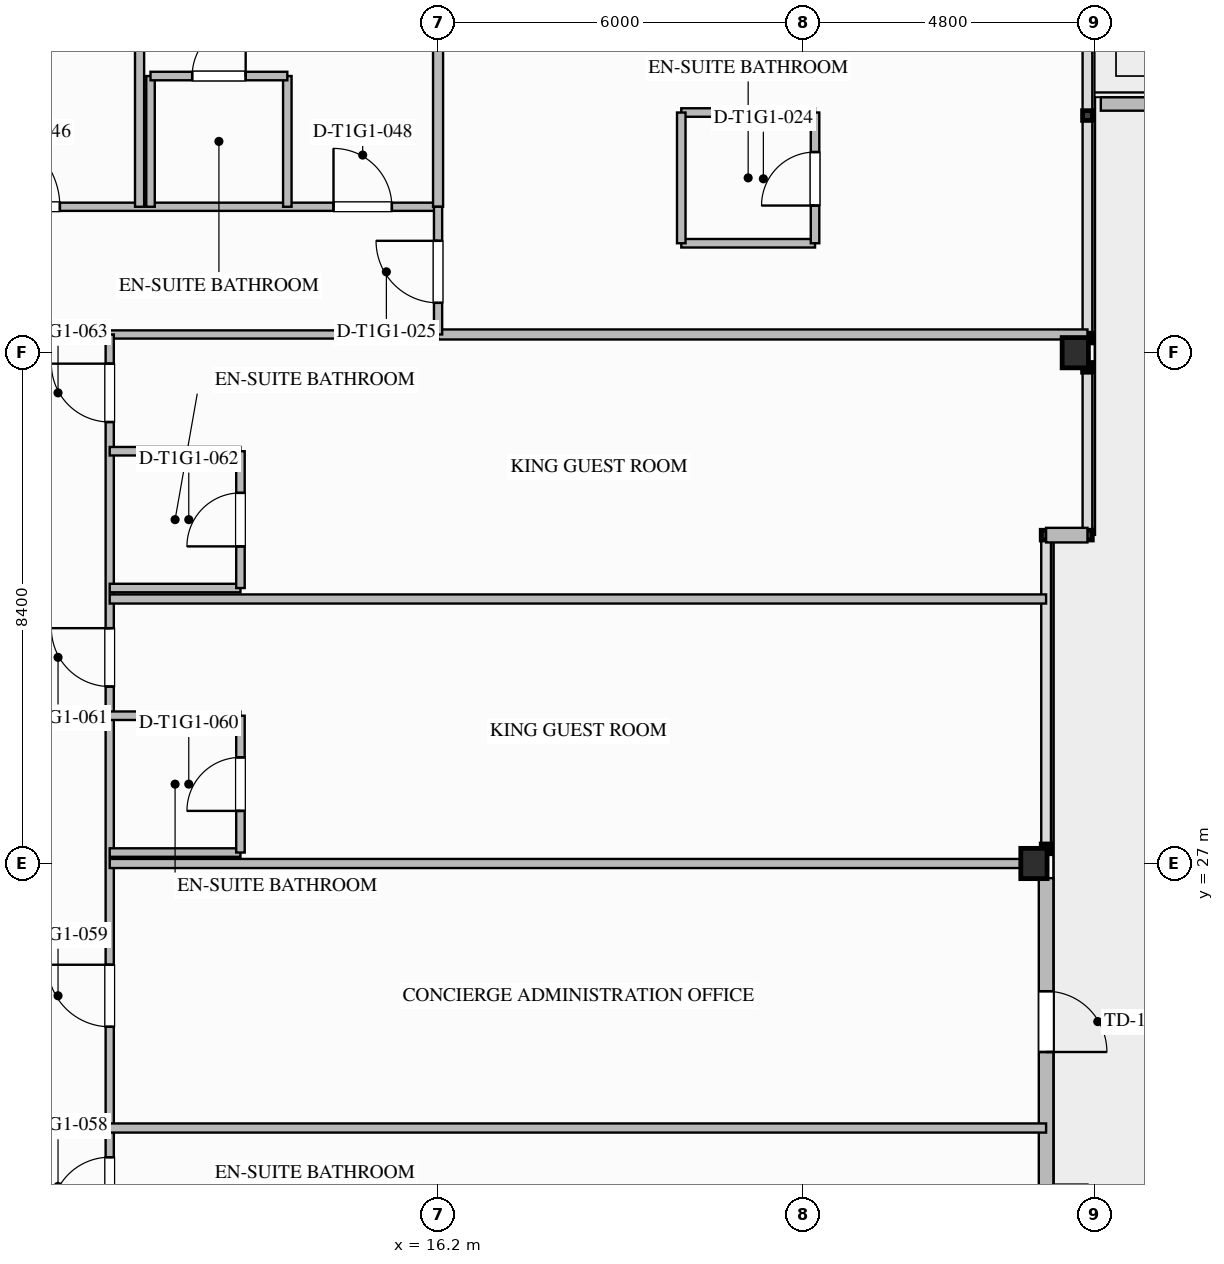
"""IFC4 building model, lengths in metres.
Left out: names, types, materials, properties, quantities, classifications, styles, units other than length and angle.
Written with IfcOpenShell. Run it as: python <this file> out.ifc"""

import sys

from ifc_helpers import new_model, si_unit, direction, frame, frame_2d, origin, origin_2d, place, context, subcontext, project, spatial, rectangle, i_section, extrude, element, fill, save


model = new_model("IFC4")
c1 = context("Model", 3, precision=1e-05, world=origin(), true_north=direction((0.0, 1.0)))
c2 = subcontext(c1, "Body", "Model", "MODEL_VIEW")
j1 = project(units=[si_unit("LENGTHUNIT", "METRE"), si_unit("PLANEANGLEUNIT", "RADIAN")], contexts=[c1])
p1 = place(None, origin())
s1 = spatial("IfcSite", under=j1, at=p1, CompositionType="ELEMENT")
p2 = place(p1, origin())
s2 = spatial("IfcBuilding", under=s1, at=p2, CompositionType="ELEMENT")
p3 = place(p2, frame((0.0, 0.0, 33.2)))
s3 = spatial("IfcBuildingStorey", under=s2, at=p3, CompositionType="ELEMENT", Elevation=33.2)
for number, where, z_axis, x_axis in (
    (1, (26.0, 27.0, -0.26), (0.0, 0.0, 1.0), (1.0, 0.0, 0.0)),
    (2, (26.68, 35.4, -0.26), (0.0, 0.0, 1.0), (1.0, 0.0, 0.0)),
):
    element("IfcColumn", number, at=place(p3, frame(where, z_axis=z_axis, x_axis=x_axis)), inside=s3, PredefinedType="COLUMN", context=c2, shape_type="SweptSolid", body=[
        extrude(i_section(OverallWidth=0.432, OverallDepth=0.498, WebThickness=0.056, FlangeThickness=0.089, FilletRadius=0.03, at=origin_2d()), origin(), (0.0, 0.0, 1.0), 3.757),
    ])
p4 = place(p3, frame((27.1, 39.49, 0.0), z_axis=(0.0, 0.0, 1.0), x_axis=(1.0, 0.0, 0.0)))
e3 = element("IfcWall", 3, at=p4, inside=s3, PredefinedType="PARAPET", context=c2, shape_type="SweptSolid", body=[
    extrude(rectangle(XDim=11.79, YDim=0.22, at=frame_2d((5.895, 0.0))), origin(), (0.0, 0.0, 1.0), 1.2),
])
p5 = place(p3, frame((26.2, 26.759, 0.0), z_axis=(0.0, 0.0, 1.0), x_axis=(0.0, -1.0, 0.0)))
e4 = element("IfcWall", 4, at=p5, inside=s3, PredefinedType="STANDARD", context=c2, shape_type="SweptSolid", body=[
    extrude(rectangle(XDim=5.279, YDim=0.24, at=frame_2d((2.64, 0.0))), origin(), (0.0, 0.0, 1.0), 2.629),
])
p6 = place(p5, frame((1.859, 0.0, 0.0)))
e5 = element("IfcOpeningElement", 5, at=p6, cuts=e4, PredefinedType="OPENING", context=c2, shape_type="SweptSolid", body=[
    extrude(rectangle(XDim=1.0, YDim=2.2, at=frame_2d((0.5, 1.1))), frame((0.0, 0.13, 0.0), z_axis=(0.0, -1.0, 0.0), x_axis=(1.0, 0.0, 0.0)), (0.0, 0.0, 1.0), 0.26),
])
p7 = place(p3, frame((26.88, 32.4, 0.0), z_axis=(0.0, 0.0, 1.0), x_axis=(-1.0, 0.0, 0.0)))
e6 = element("IfcWall", 6, at=p7, inside=s3, PredefinedType="STANDARD", context=c2, shape_type="SweptSolid", body=[
    extrude(rectangle(XDim=0.68, YDim=0.24, at=frame_2d((0.34, 0.0))), origin(), (0.0, 0.0, 1.0), 3.24),
])
p8 = place(p3, frame((-16.2, 37.8, 0.0), z_axis=(0.0, 0.0, 1.0), x_axis=(1.0, 0.0, 0.0)))
e7 = element("IfcWall", 7, at=p8, inside=s3, PredefinedType="PARTITIONING", context=c2, shape_type="SweptSolid", body=[
    extrude(rectangle(XDim=32.4, YDim=0.135, at=frame_2d((16.2, 0.0))), origin(), (0.0, 0.0, 1.0), 3.24),
])
p9 = place(p8, frame((3.189, 0.0, 0.0)))
e8 = element("IfcOpeningElement", 8, at=p9, cuts=e7, PredefinedType="OPENING", context=c2, shape_type="SweptSolid", body=[
    extrude(rectangle(XDim=0.96, YDim=2.15, at=frame_2d((0.48, 1.075))), frame((0.0, 0.077, 0.0), z_axis=(0.0, -1.0, 0.0), x_axis=(1.0, 0.0, 0.0)), (0.0, 0.0, 1.0), 0.155),
])
p10 = place(p8, frame((8.229, 0.0, 0.0)))
e9 = element("IfcOpeningElement", 9, at=p10, cuts=e7, PredefinedType="OPENING", context=c2, shape_type="SweptSolid", body=[
    extrude(rectangle(XDim=1.26, YDim=2.2, at=frame_2d((0.63, 1.1))), frame((0.0, 0.077, 0.0), z_axis=(0.0, -1.0, 0.0), x_axis=(1.0, 0.0, 0.0)), (0.0, 0.0, 1.0), 0.155),
])
p11 = place(p8, frame((12.78, 0.0, 0.0)))
e10 = element("IfcOpeningElement", 10, at=p11, cuts=e7, PredefinedType="OPENING", context=c2, shape_type="SweptSolid", body=[
    extrude(rectangle(XDim=1.02, YDim=2.15, at=frame_2d((0.51, 1.075))), frame((0.0, 0.077, 0.0), z_axis=(0.0, -1.0, 0.0), x_axis=(1.0, 0.0, 0.0)), (0.0, 0.0, 1.0), 0.155),
])
p12 = place(p8, frame((19.425, 0.0, 0.0)))
e11 = element("IfcOpeningElement", 11, at=p12, cuts=e7, PredefinedType="OPENING", context=c2, shape_type="SweptSolid", body=[
    extrude(rectangle(XDim=0.96, YDim=2.15, at=frame_2d((0.48, 1.075))), frame((0.0, 0.077, 0.0), z_axis=(0.0, -1.0, 0.0), x_axis=(1.0, 0.0, 0.0)), (0.0, 0.0, 1.0), 0.155),
])
p13 = place(p8, frame((24.92, 0.0, 0.0)))
e12 = element("IfcOpeningElement", 12, at=p13, cuts=e7, PredefinedType="OPENING", context=c2, shape_type="SweptSolid", body=[
    extrude(rectangle(XDim=1.26, YDim=2.2, at=frame_2d((0.63, 1.1))), frame((0.0, 0.077, 0.0), z_axis=(0.0, -1.0, 0.0), x_axis=(1.0, 0.0, 0.0)), (0.0, 0.0, 1.0), 0.155),
])
p14 = place(p8, frame((30.68, 0.0, 0.0)))
e13 = element("IfcOpeningElement", 13, at=p14, cuts=e7, PredefinedType="OPENING", context=c2, shape_type="SweptSolid", body=[
    extrude(rectangle(XDim=0.96, YDim=2.15, at=frame_2d((0.48, 1.075))), frame((0.0, 0.077, 0.0), z_axis=(0.0, -1.0, 0.0), x_axis=(1.0, 0.0, 0.0)), (0.0, 0.0, 1.0), 0.155),
])
p15 = place(p3, frame((10.8, 35.7, 0.0), z_axis=(0.0, 0.0, 1.0), x_axis=(1.0, 0.0, 0.0)))
e14 = element("IfcWall", 14, at=p15, inside=s3, PredefinedType="PARTITIONING", context=c2, shape_type="SweptSolid", body=[
    extrude(rectangle(XDim=5.4, YDim=0.135, at=frame_2d((2.7, 0.0))), origin(), (0.0, 0.0, 1.0), 3.24),
])
p16 = place(p3, frame((10.8, 18.3, 0.0), z_axis=(0.0, 0.0, 1.0), x_axis=(0.0, 1.0, 0.0)))
e15 = element("IfcWall", 15, at=p16, inside=s3, PredefinedType="PARTITIONING", context=c2, shape_type="SweptSolid", body=[
    extrude(rectangle(XDim=17.4, YDim=0.135, at=frame_2d((8.7, 0.0))), origin(), (0.0, 0.0, 1.0), 3.24),
])
p17 = place(p16, frame((2.91, 0.0, 0.0)))
e16 = element("IfcOpeningElement", 16, at=p17, cuts=e15, PredefinedType="OPENING", context=c2, shape_type="SweptSolid", body=[
    extrude(rectangle(XDim=0.96, YDim=2.15, at=frame_2d((0.48, 1.075))), frame((0.0, 0.077, 0.0), z_axis=(0.0, -1.0, 0.0), x_axis=(1.0, 0.0, 0.0)), (0.0, 0.0, 1.0), 0.155),
])
p18 = place(p16, frame((6.015, 0.0, 0.0)))
e17 = element("IfcOpeningElement", 17, at=p18, cuts=e15, PredefinedType="OPENING", context=c2, shape_type="SweptSolid", body=[
    extrude(rectangle(XDim=1.02, YDim=2.15, at=frame_2d((0.51, 1.075))), frame((0.0, 0.077, 0.0), z_axis=(0.0, -1.0, 0.0), x_axis=(1.0, 0.0, 0.0)), (0.0, 0.0, 1.0), 0.155),
])
p19 = place(p16, frame((11.61, 0.0, 0.0)))
e18 = element("IfcOpeningElement", 18, at=p19, cuts=e15, PredefinedType="OPENING", context=c2, shape_type="SweptSolid", body=[
    extrude(rectangle(XDim=0.96, YDim=2.15, at=frame_2d((0.48, 1.075))), frame((0.0, 0.077, 0.0), z_axis=(0.0, -1.0, 0.0), x_axis=(1.0, 0.0, 0.0)), (0.0, 0.0, 1.0), 0.155),
])
p20 = place(p16, frame((15.96, 0.0, 0.0)))
e19 = element("IfcOpeningElement", 19, at=p20, cuts=e15, PredefinedType="OPENING", context=c2, shape_type="SweptSolid", body=[
    extrude(rectangle(XDim=0.96, YDim=2.15, at=frame_2d((0.48, 1.075))), frame((0.0, 0.077, 0.0), z_axis=(0.0, -1.0, 0.0), x_axis=(1.0, 0.0, 0.0)), (0.0, 0.0, 1.0), 0.155),
])
p21 = place(p3, frame((16.2, 37.8, 0.0), z_axis=(0.0, 0.0, 1.0), x_axis=(0.0, 1.0, 0.0)))
e20 = element("IfcWall", 20, at=p21, inside=s3, PredefinedType="PARTITIONING", context=c2, shape_type="SweptSolid", body=[
    extrude(rectangle(XDim=16.08, YDim=0.165, at=frame_2d((8.04, 0.0))), origin(), (0.0, 0.0, 1.0), 2.298),
])
p22 = place(p3, frame((16.2, 35.7, 0.0), z_axis=(0.0, 0.0, 1.0), x_axis=(1.0, 0.0, 0.0)))
e21 = element("IfcWall", 21, at=p22, inside=s3, PredefinedType="PARTITIONING", context=c2, shape_type="SweptSolid", body=[
    extrude(rectangle(XDim=10.68, YDim=0.165, at=frame_2d((5.34, 0.0))), origin(), (0.0, 0.0, 1.0), 2.298),
])
p23 = place(p3, frame((16.2, 35.7, 0.0), z_axis=(0.0, 0.0, 1.0), x_axis=(0.0, 1.0, 0.0)))
e22 = element("IfcWall", 22, at=p23, inside=s3, PredefinedType="PARTITIONING", context=c2, shape_type="SweptSolid", body=[
    extrude(rectangle(XDim=2.1, YDim=0.135, at=frame_2d((1.05, 0.0))), origin(), (0.0, 0.0, 1.0), 2.298),
])
p24 = place(p23, frame((0.52, 0.0, 0.0)))
e23 = element("IfcOpeningElement", 23, at=p24, cuts=e22, PredefinedType="OPENING", context=c2, shape_type="SweptSolid", body=[
    extrude(rectangle(XDim=1.02, YDim=2.15, at=frame_2d((0.51, 1.075))), frame((0.0, 0.077, 0.0), z_axis=(0.0, -1.0, 0.0), x_axis=(1.0, 0.0, 0.0)), (0.0, 0.0, 1.0), 0.155),
])
for number, where, z_axis, x_axis in (
    (24, (20.2, 37.2, 0.0), (0.0, 0.0, 1.0), (1.0, 0.0, 0.0)),
    (25, (20.2, 39.35, 0.0), (0.0, 0.0, 1.0), (1.0, 0.0, 0.0)),
):
    element("IfcWall", number, at=place(p3, frame(where, z_axis=z_axis, x_axis=x_axis)), inside=s3, PredefinedType="PLUMBINGWALL", context=c2, shape_type="SweptSolid", body=[
        extrude(rectangle(XDim=2.2, YDim=0.14, at=frame_2d((1.1, 0.0))), origin(), (0.0, 0.0, 1.0), 3.24),
    ])
p25 = place(p3, frame((20.2, 37.2, 0.0), z_axis=(0.0, 0.0, 1.0), x_axis=(0.0, 1.0, 0.0)))
e26 = element("IfcWall", 26, at=p25, inside=s3, PredefinedType="PLUMBINGWALL", context=c2, shape_type="SweptSolid", body=[
    extrude(rectangle(XDim=2.15, YDim=0.14, at=frame_2d((1.075, 0.0))), origin(), (0.0, 0.0, 1.0), 3.24),
])
p26 = place(p3, frame((22.4, 37.2, 0.0), z_axis=(0.0, 0.0, 1.0), x_axis=(0.0, 1.0, 0.0)))
e27 = element("IfcWall", 27, at=p26, inside=s3, PredefinedType="PLUMBINGWALL", context=c2, shape_type="SweptSolid", body=[
    extrude(rectangle(XDim=2.15, YDim=0.14, at=frame_2d((1.075, 0.0))), origin(), (0.0, 0.0, 1.0), 3.24),
])
p27 = place(p26, frame((0.62, 0.0, 0.0)))
e28 = element("IfcOpeningElement", 28, at=p27, cuts=e27, PredefinedType="OPENING", context=c2, shape_type="SweptSolid", body=[
    extrude(rectangle(XDim=0.88, YDim=2.1, at=frame_2d((0.44, 1.05))), frame((0.0, 0.08, 0.0), z_axis=(0.0, -1.0, 0.0), x_axis=(1.0, 0.0, 0.0)), (0.0, 0.0, 1.0), 0.16),
])
p28 = place(p3, frame((11.291, 37.8, 0.0), z_axis=(0.0, 0.0, 1.0), x_axis=(0.0, 1.0, 0.0)))
e29 = element("IfcWall", 29, at=p28, inside=s3, PredefinedType="PARTITIONING", context=c2, shape_type="SweptSolid", body=[
    extrude(rectangle(XDim=16.08, YDim=0.15, at=frame_2d((8.04, 0.0))), origin(), (0.0, 0.0, 1.0), 3.24),
])
for number, where, z_axis, x_axis in (
    (30, (11.471, 37.8, 0.0), (0.0, 0.0, 1.0), (0.0, 1.0, 0.0)),
    (31, (13.721, 37.8, 0.0), (0.0, 0.0, 1.0), (0.0, 1.0, 0.0)),
):
    element("IfcWall", number, at=place(p3, frame(where, z_axis=z_axis, x_axis=x_axis)), inside=s3, PredefinedType="PLUMBINGWALL", context=c2, shape_type="SweptSolid", body=[
        extrude(rectangle(XDim=2.15, YDim=0.14, at=frame_2d((1.075, 0.0))), origin(), (0.0, 0.0, 1.0), 3.24),
    ])
p29 = place(p3, frame((11.471, 39.95, 0.0), z_axis=(0.0, 0.0, 1.0), x_axis=(1.0, 0.0, 0.0)))
e32 = element("IfcWall", 32, at=p29, inside=s3, PredefinedType="PLUMBINGWALL", context=c2, shape_type="SweptSolid", body=[
    extrude(rectangle(XDim=2.25, YDim=0.14, at=frame_2d((1.125, 0.0))), origin(), (0.0, 0.0, 1.0), 3.24),
])
p30 = place(p29, frame((0.685, 0.0, 0.0)))
e33 = element("IfcOpeningElement", 33, at=p30, cuts=e32, PredefinedType="OPENING", context=c2, shape_type="SweptSolid", body=[
    extrude(rectangle(XDim=0.88, YDim=2.1, at=frame_2d((0.44, 1.05))), frame((0.0, 0.08, 0.0), z_axis=(0.0, -1.0, 0.0), x_axis=(1.0, 0.0, 0.0)), (0.0, 0.0, 1.0), 0.16),
])
p31 = place(p3, frame((10.8, 22.65, 0.0), z_axis=(0.0, 0.0, 1.0), x_axis=(1.0, 0.0, 0.0)))
e34 = element("IfcWall", 34, at=p31, inside=s3, PredefinedType="PARTITIONING", context=c2, shape_type="SweptSolid", body=[
    extrude(rectangle(XDim=15.4, YDim=0.15, at=frame_2d((7.7, 0.0))), origin(), (0.0, 0.0, 1.0), 3.24),
])
p32 = place(p3, frame((10.8, 27.0, 0.0), z_axis=(0.0, 0.0, 1.0), x_axis=(1.0, 0.0, 0.0)))
e35 = element("IfcWall", 35, at=p32, inside=s3, PredefinedType="PARTITIONING", context=c2, shape_type="SweptSolid", body=[
    extrude(rectangle(XDim=15.4, YDim=0.15, at=frame_2d((7.7, 0.0))), origin(), (0.0, 0.0, 1.0), 2.298),
])
p33 = place(p3, frame((10.8, 27.18, 0.0), z_axis=(0.0, 0.0, 1.0), x_axis=(1.0, 0.0, 0.0)))
e36 = element("IfcWall", 36, at=p33, inside=s3, PredefinedType="PLUMBINGWALL", context=c2, shape_type="SweptSolid", body=[
    extrude(rectangle(XDim=2.15, YDim=0.14, at=frame_2d((1.075, 0.0))), origin(), (0.0, 0.0, 1.0), 2.617),
])
p34 = place(p3, frame((10.8, 29.43, 0.0), z_axis=(0.0, 0.0, 1.0), x_axis=(1.0, 0.0, 0.0)))
e37 = element("IfcWall", 37, at=p34, inside=s3, PredefinedType="PLUMBINGWALL", context=c2, shape_type="SweptSolid", body=[
    extrude(rectangle(XDim=2.15, YDim=0.14, at=frame_2d((1.075, 0.0))), origin(), (0.0, 0.0, 1.0), 3.24),
])
p35 = place(p3, frame((12.95, 27.18, 0.0), z_axis=(0.0, 0.0, 1.0), x_axis=(0.0, 1.0, 0.0)))
e38 = element("IfcWall", 38, at=p35, inside=s3, PredefinedType="PLUMBINGWALL", context=c2, shape_type="SweptSolid", body=[
    extrude(rectangle(XDim=2.25, YDim=0.14, at=frame_2d((1.125, 0.0))), origin(), (0.0, 0.0, 1.0), 3.24),
])
p36 = place(p35, frame((0.685, 0.0, 0.0)))
e39 = element("IfcOpeningElement", 39, at=p36, cuts=e38, PredefinedType="OPENING", context=c2, shape_type="SweptSolid", body=[
    extrude(rectangle(XDim=0.88, YDim=2.1, at=frame_2d((0.44, 1.05))), frame((0.0, 0.08, 0.0), z_axis=(0.0, -1.0, 0.0), x_axis=(1.0, 0.0, 0.0)), (0.0, 0.0, 1.0), 0.16),
])
p37 = place(p3, frame((10.8, 31.35, 0.0), z_axis=(0.0, 0.0, 1.0), x_axis=(1.0, 0.0, 0.0)))
e40 = element("IfcWall", 40, at=p37, inside=s3, PredefinedType="PARTITIONING", context=c2, shape_type="SweptSolid", body=[
    extrude(rectangle(XDim=15.4, YDim=0.15, at=frame_2d((7.7, 0.0))), origin(), (0.0, 0.0, 1.0), 3.24),
])
for number, where, z_axis, x_axis in (
    (41, (10.8, 31.53, 0.0), (0.0, 0.0, 1.0), (1.0, 0.0, 0.0)),
    (42, (10.8, 33.78, 0.0), (0.0, 0.0, 1.0), (1.0, 0.0, 0.0)),
):
    element("IfcWall", number, at=place(p3, frame(where, z_axis=z_axis, x_axis=x_axis)), inside=s3, PredefinedType="PLUMBINGWALL", context=c2, shape_type="SweptSolid", body=[
        extrude(rectangle(XDim=2.15, YDim=0.14, at=frame_2d((1.075, 0.0))), origin(), (0.0, 0.0, 1.0), 3.24),
    ])
p38 = place(p3, frame((12.95, 31.53, 0.0), z_axis=(0.0, 0.0, 1.0), x_axis=(0.0, 1.0, 0.0)))
e43 = element("IfcWall", 43, at=p38, inside=s3, PredefinedType="PLUMBINGWALL", context=c2, shape_type="SweptSolid", body=[
    extrude(rectangle(XDim=2.25, YDim=0.14, at=frame_2d((1.125, 0.0))), origin(), (0.0, 0.0, 1.0), 3.24),
])
p39 = place(p38, frame((0.685, 0.0, 0.0)))
e44 = element("IfcOpeningElement", 44, at=p39, cuts=e43, PredefinedType="OPENING", context=c2, shape_type="SweptSolid", body=[
    extrude(rectangle(XDim=0.88, YDim=2.1, at=frame_2d((0.44, 1.05))), frame((0.0, 0.08, 0.0), z_axis=(0.0, -1.0, 0.0), x_axis=(1.0, 0.0, 0.0)), (0.0, 0.0, 1.0), 0.16),
])
p40 = place(p6, origin())
e45 = element("IfcDoor", 45, at=p40, inside=s3, OperationType="SINGLE_SWING_RIGHT", PredefinedType="DOOR", context=c2, shape_type="SweptSolid", body=[
    extrude(rectangle(XDim=1.0, YDim=2.2, at=frame_2d((0.5, 1.1))), frame((0.0, 0.025, 0.0), z_axis=(0.0, -1.0, 0.0), x_axis=(1.0, 0.0, 0.0)), (0.0, 0.0, 1.0), 0.05),
])
fill(e5, e45)
p41 = place(p27, origin())
e46 = element("IfcDoor", 46, at=p41, inside=s3, OperationType="SINGLE_SWING_LEFT", PredefinedType="DOOR", context=c2, shape_type="SweptSolid", body=[
    extrude(rectangle(XDim=0.88, YDim=2.1, at=frame_2d((0.44, 1.05))), frame((0.0, 0.025, 0.0), z_axis=(0.0, -1.0, 0.0), x_axis=(1.0, 0.0, 0.0)), (0.0, 0.0, 1.0), 0.05),
])
fill(e28, e46)
p42 = place(p24, origin())
e47 = element("IfcDoor", 47, at=p42, inside=s3, OperationType="SINGLE_SWING_RIGHT", PredefinedType="DOOR", context=c2, shape_type="SweptSolid", body=[
    extrude(rectangle(XDim=1.02, YDim=2.15, at=frame_2d((0.51, 1.075))), frame((0.0, 0.025, 0.0), z_axis=(0.0, -1.0, 0.0), x_axis=(1.0, 0.0, 0.0)), (0.0, 0.0, 1.0), 0.05),
])
fill(e23, e47)
p43 = place(p13, origin())
e48 = element("IfcDoor", 48, at=p43, inside=s3, OperationType="SINGLE_SWING_LEFT", PredefinedType="DOOR", context=c2, shape_type="SweptSolid", body=[
    extrude(rectangle(XDim=1.26, YDim=2.2, at=frame_2d((0.63, 1.1))), frame((0.0, 0.025, 0.0), z_axis=(0.0, -1.0, 0.0), x_axis=(1.0, 0.0, 0.0)), (0.0, 0.0, 1.0), 0.05),
])
fill(e12, e48)
p44 = place(p30, origin())
e49 = element("IfcDoor", 49, at=p44, inside=s3, OperationType="SINGLE_SWING_RIGHT", PredefinedType="DOOR", context=c2, shape_type="SweptSolid", body=[
    extrude(rectangle(XDim=0.88, YDim=2.1, at=frame_2d((0.44, 1.05))), frame((0.0, 0.025, 0.0), z_axis=(0.0, -1.0, 0.0), x_axis=(1.0, 0.0, 0.0)), (0.0, 0.0, 1.0), 0.05),
])
fill(e33, e49)
p45 = place(p14, origin())
e50 = element("IfcDoor", 50, at=p45, inside=s3, OperationType="SINGLE_SWING_LEFT", PredefinedType="DOOR", context=c2, shape_type="SweptSolid", body=[
    extrude(rectangle(XDim=0.96, YDim=2.15, at=frame_2d((0.48, 1.075))), frame((0.0, 0.025, 0.0), z_axis=(0.0, -1.0, 0.0), x_axis=(1.0, 0.0, 0.0)), (0.0, 0.0, 1.0), 0.05),
])
fill(e13, e50)
p46 = place(p17, origin())
e51 = element("IfcDoor", 51, at=p46, inside=s3, OperationType="SINGLE_SWING_LEFT", PredefinedType="DOOR", context=c2, shape_type="SweptSolid", body=[
    extrude(rectangle(XDim=0.96, YDim=2.15, at=frame_2d((0.48, 1.075))), frame((0.0, 0.025, 0.0), z_axis=(0.0, -1.0, 0.0), x_axis=(1.0, 0.0, 0.0)), (0.0, 0.0, 1.0), 0.05),
])
fill(e16, e51)
p47 = place(p18, origin())
e52 = element("IfcDoor", 52, at=p47, inside=s3, OperationType="SINGLE_SWING_RIGHT", PredefinedType="DOOR", context=c2, shape_type="SweptSolid", body=[
    extrude(rectangle(XDim=1.02, YDim=2.15, at=frame_2d((0.51, 1.075))), frame((0.0, 0.025, 0.0), z_axis=(0.0, -1.0, 0.0), x_axis=(1.0, 0.0, 0.0)), (0.0, 0.0, 1.0), 0.05),
])
fill(e17, e52)
p48 = place(p36, origin())
e53 = element("IfcDoor", 53, at=p48, inside=s3, OperationType="SINGLE_SWING_LEFT", PredefinedType="DOOR", context=c2, shape_type="SweptSolid", body=[
    extrude(rectangle(XDim=0.88, YDim=2.1, at=frame_2d((0.44, 1.05))), frame((0.0, 0.025, 0.0), z_axis=(0.0, -1.0, 0.0), x_axis=(1.0, 0.0, 0.0)), (0.0, 0.0, 1.0), 0.05),
])
fill(e39, e53)
p49 = place(p19, origin())
e54 = element("IfcDoor", 54, at=p49, inside=s3, OperationType="SINGLE_SWING_RIGHT", PredefinedType="DOOR", context=c2, shape_type="SweptSolid", body=[
    extrude(rectangle(XDim=0.96, YDim=2.15, at=frame_2d((0.48, 1.075))), frame((0.0, 0.025, 0.0), z_axis=(0.0, -1.0, 0.0), x_axis=(1.0, 0.0, 0.0)), (0.0, 0.0, 1.0), 0.05),
])
fill(e18, e54)
p50 = place(p39, origin())
e55 = element("IfcDoor", 55, at=p50, inside=s3, OperationType="SINGLE_SWING_LEFT", PredefinedType="DOOR", context=c2, shape_type="SweptSolid", body=[
    extrude(rectangle(XDim=0.88, YDim=2.1, at=frame_2d((0.44, 1.05))), frame((0.0, 0.025, 0.0), z_axis=(0.0, -1.0, 0.0), x_axis=(1.0, 0.0, 0.0)), (0.0, 0.0, 1.0), 0.05),
])
fill(e44, e55)
p51 = place(p20, origin())
e56 = element("IfcDoor", 56, at=p51, inside=s3, OperationType="SINGLE_SWING_RIGHT", PredefinedType="DOOR", context=c2, shape_type="SweptSolid", body=[
    extrude(rectangle(XDim=0.96, YDim=2.15, at=frame_2d((0.48, 1.075))), frame((0.0, 0.025, 0.0), z_axis=(0.0, -1.0, 0.0), x_axis=(1.0, 0.0, 0.0)), (0.0, 0.0, 1.0), 0.05),
])
fill(e19, e56)
save(model, sys.argv[1])
